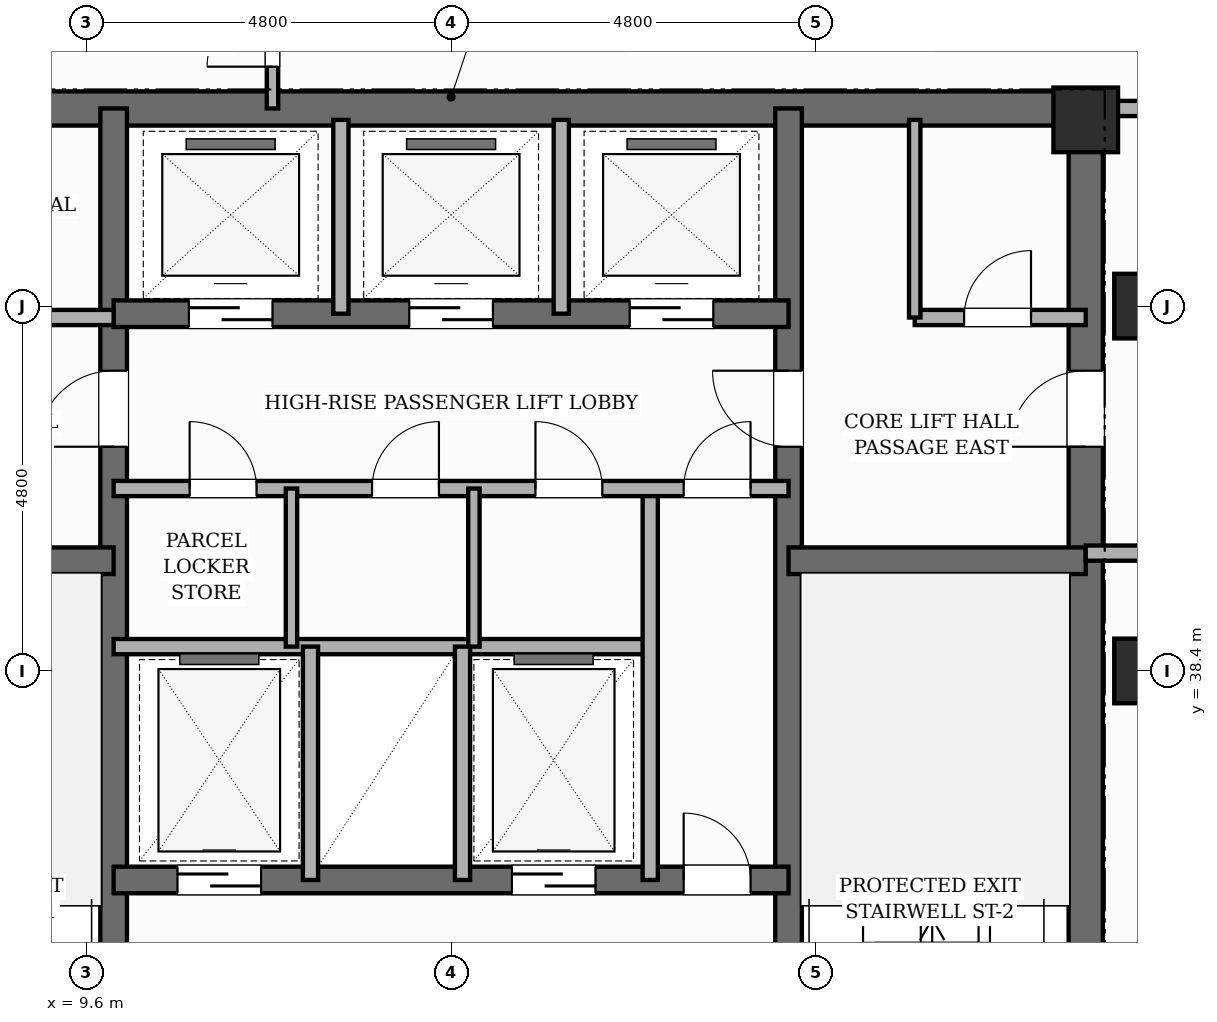
"""IFC4 building model, lengths in metres.
Left out: names, types, materials, properties, quantities, classifications, styles, units other than length and angle.
Written with IfcOpenShell. Run it as: python <this file> out.ifc"""

import sys

from ifc_helpers import new_model, si_unit, direction, frame, frame_2d, origin, origin_2d, place, context, subcontext, project, spatial, rectangle, extrude, element, fill, save


model = new_model("IFC4")
c1 = context("Model", 3, precision=1e-05, world=origin(), true_north=direction((0.0, 1.0)))
c2 = subcontext(c1, "Body", "Model", "MODEL_VIEW")
j1 = project(units=[si_unit("LENGTHUNIT", "METRE"), si_unit("PLANEANGLEUNIT", "RADIAN")], contexts=[c1])
p1 = place(None, origin())
s1 = spatial("IfcSite", under=j1, at=p1, CompositionType="ELEMENT")
p2 = place(p1, origin())
s2 = spatial("IfcBuilding", under=s1, at=p2, CompositionType="ELEMENT")
p3 = place(p2, frame((0.0, 0.0, 236.2)))
s3 = spatial("IfcBuildingStorey", under=s2, at=p3, CompositionType="ELEMENT", Elevation=236.2)
p4 = place(p3, frame((22.75, 30.675, 0.0), z_axis=(0.0, 0.0, 1.0), x_axis=(0.0, 1.0, 0.0)))
e1 = element("IfcWall", 1, at=p4, inside=s3, PredefinedType="SHEAR", context=c2, shape_type="SweptSolid", body=[
    extrude(rectangle(XDim=15.35, YDim=0.45, at=frame_2d((7.675, 0.0))), origin(), (0.0, 0.0, 1.0), 3.6),
])
p5 = place(p4, frame((10.675, 0.0, 0.0)))
e2 = element("IfcOpeningElement", 2, at=p5, cuts=e1, PredefinedType="OPENING", context=c2, shape_type="SweptSolid", body=[
    extrude(rectangle(XDim=1.0, YDim=2.15, at=frame_2d((0.5, 1.075))), frame((0.0, 0.235, 0.0), z_axis=(0.0, -1.0, 0.0), x_axis=(1.0, 0.0, 0.0)), (0.0, 0.0, 1.0), 0.47),
])
p6 = place(p3, frame((6.05, 45.8, 0.0), z_axis=(0.0, 0.0, 1.0), x_axis=(1.0, 0.0, 0.0)))
e3 = element("IfcWall", 3, at=p6, inside=s3, PredefinedType="SHEAR", context=c2, shape_type="SweptSolid", body=[
    extrude(rectangle(XDim=16.7, YDim=0.45, at=frame_2d((8.35, 0.0))), origin(), (0.0, 0.0, 1.0), 3.6),
])
p7 = place(p3, frame((9.96, 30.9, 0.0), z_axis=(0.0, 0.0, 1.0), x_axis=(0.0, 1.0, 0.0)))
e4 = element("IfcWall", 4, at=p7, inside=s3, PredefinedType="SHEAR", context=c2, shape_type="SweptSolid", body=[
    extrude(rectangle(XDim=14.9, YDim=0.35, at=frame_2d((7.45, 0.0))), origin(), (0.0, 0.0, 1.0), 3.6),
])
p8 = place(p7, frame((0.65, 0.0, 0.0)))
e5 = element("IfcOpeningElement", 5, at=p8, cuts=e4, PredefinedType="OPENING", context=c2, shape_type="SweptSolid", body=[
    extrude(rectangle(XDim=0.95, YDim=2.1, at=frame_2d((0.475, 1.05))), frame((0.0, 0.185, 0.0), z_axis=(0.0, -1.0, 0.0), x_axis=(1.0, 0.0, 0.0)), (0.0, 0.0, 1.0), 0.37),
])
p9 = place(p7, frame((10.45, 0.0, 0.0)))
e6 = element("IfcOpeningElement", 6, at=p9, cuts=e4, PredefinedType="OPENING", context=c2, shape_type="SweptSolid", body=[
    extrude(rectangle(XDim=1.0, YDim=2.15, at=frame_2d((0.5, 1.075))), frame((0.0, 0.185, 0.0), z_axis=(0.0, -1.0, 0.0), x_axis=(1.0, 0.0, 0.0)), (0.0, 0.0, 1.0), 0.37),
])
p10 = place(p3, frame((18.84, 30.9, 0.0), z_axis=(0.0, 0.0, 1.0), x_axis=(0.0, 1.0, 0.0)))
e7 = element("IfcWall", 7, at=p10, inside=s3, PredefinedType="SHEAR", context=c2, shape_type="SweptSolid", body=[
    extrude(rectangle(XDim=14.9, YDim=0.35, at=frame_2d((7.45, 0.0))), origin(), (0.0, 0.0, 1.0), 3.6),
])
p11 = place(p10, frame((0.65, 0.0, 0.0)))
e8 = element("IfcOpeningElement", 8, at=p11, cuts=e7, PredefinedType="OPENING", context=c2, shape_type="SweptSolid", body=[
    extrude(rectangle(XDim=0.95, YDim=2.1, at=frame_2d((0.475, 1.05))), frame((0.0, 0.185, 0.0), z_axis=(0.0, -1.0, 0.0), x_axis=(1.0, 0.0, 0.0)), (0.0, 0.0, 1.0), 0.37),
])
p12 = place(p10, frame((10.45, 0.0, 0.0)))
e9 = element("IfcOpeningElement", 9, at=p12, cuts=e7, PredefinedType="OPENING", context=c2, shape_type="SweptSolid", body=[
    extrude(rectangle(XDim=1.0, YDim=2.15, at=frame_2d((0.5, 1.075))), frame((0.0, 0.185, 0.0), z_axis=(0.0, -1.0, 0.0), x_axis=(1.0, 0.0, 0.0)), (0.0, 0.0, 1.0), 0.37),
])
for number, where, z_axis, x_axis in (
    (10, (6.05, 39.85, 0.0), (0.0, 0.0, 1.0), (1.0, 0.0, 0.0)),
    (11, (18.84, 39.85, 0.0), (0.0, 0.0, 1.0), (1.0, 0.0, 0.0)),
):
    element("IfcWall", number, at=place(p3, frame(where, z_axis=z_axis, x_axis=x_axis)), inside=s3, PredefinedType="SHEAR", context=c2, shape_type="SweptSolid", body=[
        extrude(rectangle(XDim=3.91, YDim=0.35, at=frame_2d((1.955, 0.0))), origin(), (0.0, 0.0, 1.0), 3.6),
    ])
p13 = place(p3, frame((9.96, 35.65, 0.0), z_axis=(0.0, 0.0, 1.0), x_axis=(1.0, 0.0, 0.0)))
e12 = element("IfcWall", 12, at=p13, inside=s3, PredefinedType="SHEAR", context=c2, shape_type="SweptSolid", body=[
    extrude(rectangle(XDim=8.88, YDim=0.35, at=frame_2d((4.44, 0.0))), origin(), (0.0, 0.0, 1.0), 3.6),
])
p14 = place(p13, frame((0.84, 0.0, 0.0)))
e13 = element("IfcOpeningElement", 13, at=p14, cuts=e12, PredefinedType="OPENING", context=c2, shape_type="SweptSolid", body=[
    extrude(rectangle(XDim=1.1, YDim=2.15, at=frame_2d((0.55, 1.075))), frame((0.0, 0.185, 0.0), z_axis=(0.0, -1.0, 0.0), x_axis=(1.0, 0.0, 0.0)), (0.0, 0.0, 1.0), 0.37),
])
p15 = place(p13, frame((5.24, 0.0, 0.0)))
e14 = element("IfcOpeningElement", 14, at=p15, cuts=e12, PredefinedType="OPENING", context=c2, shape_type="SweptSolid", body=[
    extrude(rectangle(XDim=1.1, YDim=2.15, at=frame_2d((0.55, 1.075))), frame((0.0, 0.185, 0.0), z_axis=(0.0, -1.0, 0.0), x_axis=(1.0, 0.0, 0.0)), (0.0, 0.0, 1.0), 0.37),
])
p16 = place(p13, frame((7.5, 0.0, 0.0)))
e15 = element("IfcOpeningElement", 15, at=p16, cuts=e12, PredefinedType="OPENING", context=c2, shape_type="SweptSolid", body=[
    extrude(rectangle(XDim=0.88, YDim=2.1, at=frame_2d((0.44, 1.05))), frame((0.0, 0.185, 0.0), z_axis=(0.0, -1.0, 0.0), x_axis=(1.0, 0.0, 0.0)), (0.0, 0.0, 1.0), 0.37),
])
p17 = place(p3, frame((9.96, 43.1, 0.0), z_axis=(0.0, 0.0, 1.0), x_axis=(1.0, 0.0, 0.0)))
e16 = element("IfcWall", 16, at=p17, inside=s3, PredefinedType="SHEAR", context=c2, shape_type="SweptSolid", body=[
    extrude(rectangle(XDim=8.88, YDim=0.35, at=frame_2d((4.44, 0.0))), origin(), (0.0, 0.0, 1.0), 3.6),
])
p18 = place(p17, frame((0.99, 0.0, 0.0)))
e17 = element("IfcOpeningElement", 17, at=p18, cuts=e16, PredefinedType="OPENING", context=c2, shape_type="SweptSolid", body=[
    extrude(rectangle(XDim=1.1, YDim=2.15, at=frame_2d((0.55, 1.075))), frame((0.0, 0.185, 0.0), z_axis=(0.0, -1.0, 0.0), x_axis=(1.0, 0.0, 0.0)), (0.0, 0.0, 1.0), 0.37),
])
p19 = place(p17, frame((3.89, 0.0, 0.0)))
e18 = element("IfcOpeningElement", 18, at=p19, cuts=e16, PredefinedType="OPENING", context=c2, shape_type="SweptSolid", body=[
    extrude(rectangle(XDim=1.1, YDim=2.15, at=frame_2d((0.55, 1.075))), frame((0.0, 0.185, 0.0), z_axis=(0.0, -1.0, 0.0), x_axis=(1.0, 0.0, 0.0)), (0.0, 0.0, 1.0), 0.37),
])
p20 = place(p17, frame((6.79, 0.0, 0.0)))
e19 = element("IfcOpeningElement", 19, at=p20, cuts=e16, PredefinedType="OPENING", context=c2, shape_type="SweptSolid", body=[
    extrude(rectangle(XDim=1.1, YDim=2.15, at=frame_2d((0.55, 1.075))), frame((0.0, 0.185, 0.0), z_axis=(0.0, -1.0, 0.0), x_axis=(1.0, 0.0, 0.0)), (0.0, 0.0, 1.0), 0.37),
])
for number, where, z_axis, x_axis in (
    (20, (22.75, 45.65, 0.0), (0.0, 0.0, 1.0), (1.0, 0.0, 0.0)),
    (21, (23.55, 38.4, 0.0), (0.0, 0.0, 1.0), (1.0, 0.0, 0.0)),
    (22, (23.55, 43.2, 0.0), (0.0, 0.0, 1.0), (1.0, 0.0, 0.0)),
):
    element("IfcColumn", number, at=place(p3, frame(where, z_axis=z_axis, x_axis=x_axis)), inside=s3, PredefinedType="COLUMN", context=c2, shape_type="SweptSolid", body=[
        extrude(rectangle(XDim=0.85, YDim=0.85, at=origin_2d()), origin(), (0.0, 0.0, 1.0), 3.6),
    ])
p21 = place(p3, frame((9.96, 38.72, 0.0), z_axis=(0.0, 0.0, 1.0), x_axis=(1.0, 0.0, 0.0)))
e23 = element("IfcWall", 23, at=p21, inside=s3, PredefinedType="POLYGONAL", context=c2, shape_type="SweptSolid", body=[
    extrude(rectangle(XDim=7.06, YDim=0.2, at=frame_2d((3.53, 0.0))), origin(), (0.0, 0.0, 1.0), 3.32),
])
for number, where, z_axis, x_axis in (
    (24, (12.55, 35.65, 0.0), (0.0, 0.0, 1.0), (0.0, 1.0, 0.0)),
    (25, (14.55, 35.65, 0.0), (0.0, 0.0, 1.0), (0.0, 1.0, 0.0)),
):
    element("IfcWall", number, at=place(p3, frame(where, z_axis=z_axis, x_axis=x_axis)), inside=s3, PredefinedType="POLYGONAL", context=c2, shape_type="SweptSolid", body=[
        extrude(rectangle(XDim=3.07, YDim=0.2, at=frame_2d((1.535, 0.0))), origin(), (0.0, 0.0, 1.0), 3.32),
    ])
p22 = place(p3, frame((17.02, 35.65, 0.0), z_axis=(0.0, 0.0, 1.0), x_axis=(0.0, 1.0, 0.0)))
e26 = element("IfcWall", 26, at=p22, inside=s3, PredefinedType="POLYGONAL", context=c2, shape_type="SweptSolid", body=[
    extrude(rectangle(XDim=5.15, YDim=0.2, at=frame_2d((2.575, 0.0))), origin(), (0.0, 0.0, 1.0), 3.32),
])
p23 = place(p3, frame((9.96, 40.8, 0.0), z_axis=(0.0, 0.0, 1.0), x_axis=(1.0, 0.0, 0.0)))
e27 = element("IfcWall", 27, at=p23, inside=s3, PredefinedType="POLYGONAL", context=c2, shape_type="SweptSolid", body=[
    extrude(rectangle(XDim=8.88, YDim=0.2, at=frame_2d((4.44, 0.0))), origin(), (0.0, 0.0, 1.0), 3.32),
])
p24 = place(p23, frame((7.5, 0.0, 0.0)))
e28 = element("IfcOpeningElement", 28, at=p24, cuts=e27, PredefinedType="OPENING", context=c2, shape_type="SweptSolid", body=[
    extrude(rectangle(XDim=0.88, YDim=2.1, at=frame_2d((0.44, 1.05))), frame((0.0, 0.11, 0.0), z_axis=(0.0, -1.0, 0.0), x_axis=(1.0, 0.0, 0.0)), (0.0, 0.0, 1.0), 0.22),
])
p25 = place(p23, frame((1.0, 0.0, 0.0)))
e29 = element("IfcOpeningElement", 29, at=p25, cuts=e27, PredefinedType="OPENING", context=c2, shape_type="SweptSolid", body=[
    extrude(rectangle(XDim=0.88, YDim=2.1, at=frame_2d((0.44, 1.05))), frame((0.0, 0.11, 0.0), z_axis=(0.0, -1.0, 0.0), x_axis=(1.0, 0.0, 0.0)), (0.0, 0.0, 1.0), 0.22),
])
p26 = place(p23, frame((3.4, 0.0, 0.0)))
e30 = element("IfcOpeningElement", 30, at=p26, cuts=e27, PredefinedType="OPENING", context=c2, shape_type="SweptSolid", body=[
    extrude(rectangle(XDim=0.88, YDim=2.1, at=frame_2d((0.44, 1.05))), frame((0.0, 0.11, 0.0), z_axis=(0.0, -1.0, 0.0), x_axis=(1.0, 0.0, 0.0)), (0.0, 0.0, 1.0), 0.22),
])
p27 = place(p23, frame((5.55, 0.0, 0.0)))
e31 = element("IfcOpeningElement", 31, at=p27, cuts=e27, PredefinedType="OPENING", context=c2, shape_type="SweptSolid", body=[
    extrude(rectangle(XDim=0.88, YDim=2.1, at=frame_2d((0.44, 1.05))), frame((0.0, 0.11, 0.0), z_axis=(0.0, -1.0, 0.0), x_axis=(1.0, 0.0, 0.0)), (0.0, 0.0, 1.0), 0.22),
])
p28 = place(p3, frame((20.5, 43.05, 0.0), z_axis=(0.0, 0.0, 1.0), x_axis=(1.0, 0.0, 0.0)))
e32 = element("IfcWall", 32, at=p28, inside=s3, PredefinedType="POLYGONAL", context=c2, shape_type="SweptSolid", body=[
    extrude(rectangle(XDim=2.25, YDim=0.2, at=frame_2d((1.125, 0.0))), origin(), (0.0, 0.0, 1.0), 2.6),
])
p29 = place(p28, frame((0.65, 0.0, 0.0)))
e33 = element("IfcOpeningElement", 33, at=p29, cuts=e32, PredefinedType="OPENING", context=c2, shape_type="SweptSolid", body=[
    extrude(rectangle(XDim=0.88, YDim=2.1, at=frame_2d((0.44, 1.05))), frame((0.0, 0.11, 0.0), z_axis=(0.0, -1.0, 0.0), x_axis=(1.0, 0.0, 0.0)), (0.0, 0.0, 1.0), 0.22),
])
p30 = place(p3, frame((6.05, 43.05, 0.0), z_axis=(0.0, 0.0, 1.0), x_axis=(1.0, 0.0, 0.0)))
e34 = element("IfcWall", 34, at=p30, inside=s3, PredefinedType="POLYGONAL", context=c2, shape_type="SweptSolid", body=[
    extrude(rectangle(XDim=3.91, YDim=0.2, at=frame_2d((1.955, 0.0))), origin(), (0.0, 0.0, 1.0), 2.6),
])
p31 = place(p30, frame((1.35, 0.0, 0.0)))
e35 = element("IfcOpeningElement", 35, at=p31, cuts=e34, PredefinedType="OPENING", context=c2, shape_type="SweptSolid", body=[
    extrude(rectangle(XDim=0.88, YDim=2.1, at=frame_2d((0.44, 1.05))), frame((0.0, 0.11, 0.0), z_axis=(0.0, -1.0, 0.0), x_axis=(1.0, 0.0, 0.0)), (0.0, 0.0, 1.0), 0.22),
])
for number, where, z_axis, x_axis in (
    (36, (12.95, 43.1, 0.0), (0.0, 0.0, 1.0), (0.0, 1.0, 0.0)),
    (37, (15.85, 43.1, 0.0), (0.0, 0.0, 1.0), (0.0, 1.0, 0.0)),
):
    element("IfcWall", number, at=place(p3, frame(where, z_axis=z_axis, x_axis=x_axis)), inside=s3, PredefinedType="POLYGONAL", context=c2, shape_type="SweptSolid", body=[
        extrude(rectangle(XDim=2.55, YDim=0.2, at=frame_2d((1.275, 0.0))), origin(), (0.0, 0.0, 1.0), 3.32),
    ])
for number, where, z_axis, x_axis in (
    (38, (12.3, 38.72, 0.0), (0.0, 0.0, 1.0), (0.0, 1.0, 0.0)),
    (39, (14.7, 38.72, 0.0), (0.0, 0.0, 1.0), (0.0, 1.0, 0.0)),
):
    element("IfcWall", number, at=place(p3, frame(where, z_axis=z_axis, x_axis=x_axis)), inside=s3, PredefinedType="PARTITIONING", context=c2, shape_type="SweptSolid", body=[
        extrude(rectangle(XDim=2.08, YDim=0.15, at=frame_2d((1.04, 0.0))), origin(), (0.0, 0.0, 1.0), 3.32),
    ])
p32 = place(p3, frame((20.5, 43.05, 0.0), z_axis=(0.0, 0.0, 1.0), x_axis=(0.0, 1.0, 0.0)))
e40 = element("IfcWall", 40, at=p32, inside=s3, PredefinedType="PARTITIONING", context=c2, shape_type="SweptSolid", body=[
    extrude(rectangle(XDim=2.6, YDim=0.15, at=frame_2d((1.3, 0.0))), origin(), (0.0, 0.0, 1.0), 3.32),
])
p33 = place(p3, frame((22.75, 45.8, 0.0), z_axis=(0.0, 0.0, 1.0), x_axis=(1.0, 0.0, 0.0)))
e41 = element("IfcWall", 41, at=p33, inside=s3, PredefinedType="PARTITIONING", context=c2, shape_type="SweptSolid", body=[
    extrude(rectangle(XDim=2.75, YDim=0.2, at=frame_2d((1.375, 0.0))), origin(), (0.0, 0.0, 1.0), 3.32),
])
p34 = place(p3, frame((12.05, 45.8, 0.0), z_axis=(0.0, 0.0, 1.0), x_axis=(0.0, 1.0, 0.0)))
e42 = element("IfcWall", 42, at=p34, inside=s3, PredefinedType="PARTITIONING", context=c2, shape_type="SweptSolid", body=[
    extrude(rectangle(XDim=1.92, YDim=0.15, at=frame_2d((0.96, 0.0))), origin(), (0.0, 0.0, 1.0), 3.32),
])
p35 = place(p34, frame((0.55, 0.0, 0.0)))
e43 = element("IfcOpeningElement", 43, at=p35, cuts=e42, PredefinedType="OPENING", context=c2, shape_type="SweptSolid", body=[
    extrude(rectangle(XDim=0.86, YDim=2.1, at=frame_2d((0.43, 1.05))), frame((0.0, 0.085, 0.0), z_axis=(0.0, -1.0, 0.0), x_axis=(1.0, 0.0, 0.0)), (0.0, 0.0, 1.0), 0.17),
])
p36 = place(p3, frame((22.75, 39.95, 0.0), z_axis=(0.0, 0.0, 1.0), x_axis=(1.0, 0.0, 0.0)))
e44 = element("IfcWall", 44, at=p36, inside=s3, PredefinedType="PARTITIONING", context=c2, shape_type="SweptSolid", body=[
    extrude(rectangle(XDim=2.75, YDim=0.2, at=frame_2d((1.375, 0.0))), origin(), (0.0, 0.0, 1.0), 3.32),
])
p37 = place(p14, origin())
e45 = element("IfcDoor", 45, at=p37, inside=s3, OperationType="SLIDING_TO_LEFT", PredefinedType="DOOR", context=c2, shape_type="SweptSolid", body=[
    extrude(rectangle(XDim=1.1, YDim=2.15, at=frame_2d((0.55, 1.075))), frame((0.0, 0.025, 0.0), z_axis=(0.0, -1.0, 0.0), x_axis=(1.0, 0.0, 0.0)), (0.0, 0.0, 1.0), 0.05),
])
fill(e13, e45)
p38 = place(p15, origin())
e46 = element("IfcDoor", 46, at=p38, inside=s3, OperationType="SLIDING_TO_RIGHT", PredefinedType="DOOR", context=c2, shape_type="SweptSolid", body=[
    extrude(rectangle(XDim=1.1, YDim=2.15, at=frame_2d((0.55, 1.075))), frame((0.0, 0.025, 0.0), z_axis=(0.0, -1.0, 0.0), x_axis=(1.0, 0.0, 0.0)), (0.0, 0.0, 1.0), 0.05),
])
fill(e14, e46)
p39 = place(p16, origin())
e47 = element("IfcDoor", 47, at=p39, inside=s3, OperationType="SINGLE_SWING_LEFT", PredefinedType="DOOR", context=c2, shape_type="SweptSolid", body=[
    extrude(rectangle(XDim=0.88, YDim=2.1, at=frame_2d((0.44, 1.05))), frame((0.0, 0.025, 0.0), z_axis=(0.0, -1.0, 0.0), x_axis=(1.0, 0.0, 0.0)), (0.0, 0.0, 1.0), 0.05),
])
fill(e15, e47)
p40 = place(p24, origin())
e48 = element("IfcDoor", 48, at=p40, inside=s3, OperationType="SINGLE_SWING_RIGHT", PredefinedType="DOOR", context=c2, shape_type="SweptSolid", body=[
    extrude(rectangle(XDim=0.88, YDim=2.1, at=frame_2d((0.44, 1.05))), frame((0.0, 0.025, 0.0), z_axis=(0.0, -1.0, 0.0), x_axis=(1.0, 0.0, 0.0)), (0.0, 0.0, 1.0), 0.05),
])
fill(e28, e48)
p41 = place(p18, origin())
e49 = element("IfcDoor", 49, at=p41, inside=s3, OperationType="SLIDING_TO_LEFT", PredefinedType="DOOR", context=c2, shape_type="SweptSolid", body=[
    extrude(rectangle(XDim=1.1, YDim=2.15, at=frame_2d((0.55, 1.075))), frame((0.0, 0.025, 0.0), z_axis=(0.0, -1.0, 0.0), x_axis=(1.0, 0.0, 0.0)), (0.0, 0.0, 1.0), 0.05),
])
fill(e17, e49)
p42 = place(p19, origin())
e50 = element("IfcDoor", 50, at=p42, inside=s3, OperationType="SLIDING_TO_RIGHT", PredefinedType="DOOR", context=c2, shape_type="SweptSolid", body=[
    extrude(rectangle(XDim=1.1, YDim=2.15, at=frame_2d((0.55, 1.075))), frame((0.0, 0.025, 0.0), z_axis=(0.0, -1.0, 0.0), x_axis=(1.0, 0.0, 0.0)), (0.0, 0.0, 1.0), 0.05),
])
fill(e18, e50)
p43 = place(p20, origin())
e51 = element("IfcDoor", 51, at=p43, inside=s3, OperationType="SLIDING_TO_LEFT", PredefinedType="DOOR", context=c2, shape_type="SweptSolid", body=[
    extrude(rectangle(XDim=1.1, YDim=2.15, at=frame_2d((0.55, 1.075))), frame((0.0, 0.025, 0.0), z_axis=(0.0, -1.0, 0.0), x_axis=(1.0, 0.0, 0.0)), (0.0, 0.0, 1.0), 0.05),
])
fill(e19, e51)
p44 = place(p9, origin())
e52 = element("IfcDoor", 52, at=p44, inside=s3, OperationType="SINGLE_SWING_LEFT", PredefinedType="DOOR", context=c2, shape_type="SweptSolid", body=[
    extrude(rectangle(XDim=1.0, YDim=2.15, at=frame_2d((0.5, 1.075))), frame((0.0, 0.025, 0.0), z_axis=(0.0, -1.0, 0.0), x_axis=(1.0, 0.0, 0.0)), (0.0, 0.0, 1.0), 0.05),
])
fill(e6, e52)
p45 = place(p12, origin())
e53 = element("IfcDoor", 53, at=p45, inside=s3, OperationType="SINGLE_SWING_RIGHT", PredefinedType="DOOR", context=c2, shape_type="SweptSolid", body=[
    extrude(rectangle(XDim=1.0, YDim=2.15, at=frame_2d((0.5, 1.075))), frame((0.0, 0.025, 0.0), z_axis=(0.0, -1.0, 0.0), x_axis=(1.0, 0.0, 0.0)), (0.0, 0.0, 1.0), 0.05),
])
fill(e9, e53)
p46 = place(p5, origin())
e54 = element("IfcDoor", 54, at=p46, inside=s3, OperationType="SINGLE_SWING_LEFT", PredefinedType="DOOR", context=c2, shape_type="SweptSolid", body=[
    extrude(rectangle(XDim=1.0, YDim=2.15, at=frame_2d((0.5, 1.075))), frame((0.0, 0.025, 0.0), z_axis=(0.0, -1.0, 0.0), x_axis=(1.0, 0.0, 0.0)), (0.0, 0.0, 1.0), 0.05),
])
fill(e2, e54)
p47 = place(p25, origin())
e55 = element("IfcDoor", 55, at=p47, inside=s3, OperationType="SINGLE_SWING_LEFT", PredefinedType="DOOR", context=c2, shape_type="SweptSolid", body=[
    extrude(rectangle(XDim=0.88, YDim=2.1, at=frame_2d((0.44, 1.05))), frame((0.0, 0.025, 0.0), z_axis=(0.0, -1.0, 0.0), x_axis=(1.0, 0.0, 0.0)), (0.0, 0.0, 1.0), 0.05),
])
fill(e29, e55)
p48 = place(p26, origin())
e56 = element("IfcDoor", 56, at=p48, inside=s3, OperationType="SINGLE_SWING_RIGHT", PredefinedType="DOOR", context=c2, shape_type="SweptSolid", body=[
    extrude(rectangle(XDim=0.88, YDim=2.1, at=frame_2d((0.44, 1.05))), frame((0.0, 0.025, 0.0), z_axis=(0.0, -1.0, 0.0), x_axis=(1.0, 0.0, 0.0)), (0.0, 0.0, 1.0), 0.05),
])
fill(e30, e56)
p49 = place(p27, origin())
e57 = element("IfcDoor", 57, at=p49, inside=s3, OperationType="SINGLE_SWING_LEFT", PredefinedType="DOOR", context=c2, shape_type="SweptSolid", body=[
    extrude(rectangle(XDim=0.88, YDim=2.1, at=frame_2d((0.44, 1.05))), frame((0.0, 0.025, 0.0), z_axis=(0.0, -1.0, 0.0), x_axis=(1.0, 0.0, 0.0)), (0.0, 0.0, 1.0), 0.05),
])
fill(e31, e57)
p50 = place(p29, origin())
e58 = element("IfcDoor", 58, at=p50, inside=s3, OperationType="SINGLE_SWING_RIGHT", PredefinedType="DOOR", context=c2, shape_type="SweptSolid", body=[
    extrude(rectangle(XDim=0.88, YDim=2.1, at=frame_2d((0.44, 1.05))), frame((0.0, 0.025, 0.0), z_axis=(0.0, -1.0, 0.0), x_axis=(1.0, 0.0, 0.0)), (0.0, 0.0, 1.0), 0.05),
])
fill(e33, e58)
p51 = place(p35, origin())
e59 = element("IfcDoor", 59, at=p51, inside=s3, OperationType="SINGLE_SWING_LEFT", PredefinedType="DOOR", context=c2, shape_type="SweptSolid", body=[
    extrude(rectangle(XDim=0.86, YDim=2.1, at=frame_2d((0.43, 1.05))), frame((0.0, 0.025, 0.0), z_axis=(0.0, -1.0, 0.0), x_axis=(1.0, 0.0, 0.0)), (0.0, 0.0, 1.0), 0.05),
])
fill(e43, e59)
save(model, sys.argv[1])
